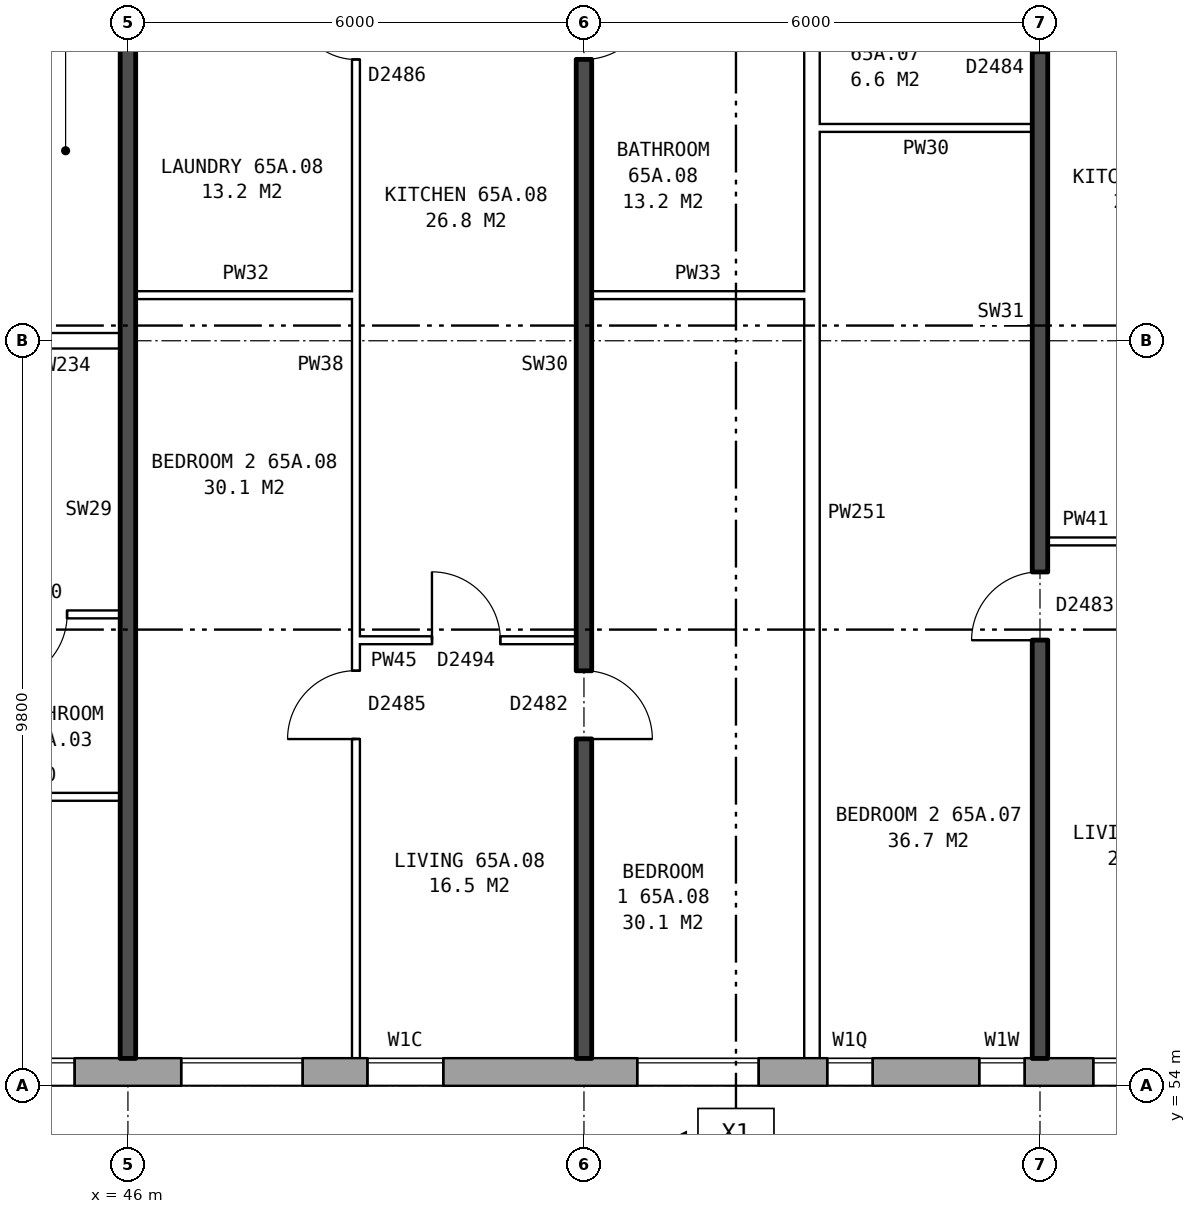
"""IFC4 building model, lengths in metres.
Left out: names, types, materials, properties, quantities, classifications, styles, units other than length and angle.
Written with IfcOpenShell. Run it as: python <this file> out.ifc"""

import sys

from ifc_helpers import new_model, si_unit, direction, frame, frame_2d, origin, place, context, subcontext, project, spatial, rectangle, extrude, element, fill, save


model = new_model("IFC4")
c1 = context("Model", 3, precision=1e-05, world=origin(), true_north=direction((0.0, 1.0)))
c2 = subcontext(c1, "Body", "Model", "MODEL_VIEW")
j1 = project(units=[si_unit("LENGTHUNIT", "METRE"), si_unit("PLANEANGLEUNIT", "RADIAN")], contexts=[c1])
p1 = place(None, origin())
s1 = spatial("IfcSite", under=j1, at=p1, CompositionType="ELEMENT")
p2 = place(p1, origin())
s2 = spatial("IfcBuilding", under=s1, at=p2, CompositionType="ELEMENT")
p3 = place(p2, frame((0.0, 0.0, 230.7)))
s3 = spatial("IfcBuildingStorey", under=s2, at=p3, CompositionType="ELEMENT", Elevation=230.7)
p4 = place(p3, frame((35.075, 54.18, 0.0), z_axis=(0.0, 0.0, 1.0), x_axis=(1.0, 0.0, 0.0)))
e1 = element("IfcWall", 1, at=p4, inside=s3, PredefinedType="STANDARD", context=c2, shape_type="SweptSolid", body=[
    extrude(rectangle(XDim=39.875, YDim=0.36, at=frame_2d((19.938, 0.0))), origin(), (0.0, 0.0, 1.0), 2.85),
])
p5 = place(p4, frame((2.625, 0.0, 0.8)))
e2 = element("IfcOpeningElement", 2, at=p5, cuts=e1, PredefinedType="OPENING", context=c2, shape_type="SweptSolid", body=[
    extrude(rectangle(XDim=1.6, YDim=1.8, at=frame_2d((0.8, 0.9))), frame((0.0, 0.19, 0.0), z_axis=(0.0, -1.0, 0.0), x_axis=(1.0, 0.0, 0.0)), (0.0, 0.0, 1.0), 0.38),
])
p6 = place(p4, frame((5.625, 0.0, 0.8)))
e3 = element("IfcOpeningElement", 3, at=p6, cuts=e1, PredefinedType="OPENING", context=c2, shape_type="SweptSolid", body=[
    extrude(rectangle(XDim=1.6, YDim=1.8, at=frame_2d((0.8, 0.9))), frame((0.0, 0.19, 0.0), z_axis=(0.0, -1.0, 0.0), x_axis=(1.0, 0.0, 0.0)), (0.0, 0.0, 1.0), 0.38),
])
p7 = place(p4, frame((8.625, 0.0, 0.8)))
e4 = element("IfcOpeningElement", 4, at=p7, cuts=e1, PredefinedType="OPENING", context=c2, shape_type="SweptSolid", body=[
    extrude(rectangle(XDim=1.6, YDim=1.8, at=frame_2d((0.8, 0.9))), frame((0.0, 0.19, 0.0), z_axis=(0.0, -1.0, 0.0), x_axis=(1.0, 0.0, 0.0)), (0.0, 0.0, 1.0), 0.38),
])
p8 = place(p4, frame((11.625, 0.0, 0.8)))
e5 = element("IfcOpeningElement", 5, at=p8, cuts=e1, PredefinedType="OPENING", context=c2, shape_type="SweptSolid", body=[
    extrude(rectangle(XDim=1.6, YDim=1.8, at=frame_2d((0.8, 0.9))), frame((0.0, 0.19, 0.0), z_axis=(0.0, -1.0, 0.0), x_axis=(1.0, 0.0, 0.0)), (0.0, 0.0, 1.0), 0.38),
])
p9 = place(p4, frame((14.075, 0.0, 0.8)))
e6 = element("IfcOpeningElement", 6, at=p9, cuts=e1, PredefinedType="OPENING", context=c2, shape_type="SweptSolid", body=[
    extrude(rectangle(XDim=1.0, YDim=1.8, at=frame_2d((0.5, 0.9))), frame((0.0, 0.19, 0.0), z_axis=(0.0, -1.0, 0.0), x_axis=(1.0, 0.0, 0.0)), (0.0, 0.0, 1.0), 0.38),
])
p10 = place(p4, frame((17.625, 0.0, 0.8)))
e7 = element("IfcOpeningElement", 7, at=p10, cuts=e1, PredefinedType="OPENING", context=c2, shape_type="SweptSolid", body=[
    extrude(rectangle(XDim=1.6, YDim=1.8, at=frame_2d((0.8, 0.9))), frame((0.0, 0.19, 0.0), z_axis=(0.0, -1.0, 0.0), x_axis=(1.0, 0.0, 0.0)), (0.0, 0.0, 1.0), 0.38),
])
p11 = place(p4, frame((20.125, 0.0, 0.8)))
e8 = element("IfcOpeningElement", 8, at=p11, cuts=e1, PredefinedType="OPENING", context=c2, shape_type="SweptSolid", body=[
    extrude(rectangle(XDim=0.6, YDim=1.2, at=frame_2d((0.3, 0.6))), frame((0.0, 0.19, 0.0), z_axis=(0.0, -1.0, 0.0), x_axis=(1.0, 0.0, 0.0)), (0.0, 0.0, 1.0), 0.38),
])
p12 = place(p4, frame((23.625, 0.0, 0.8)))
e9 = element("IfcOpeningElement", 9, at=p12, cuts=e1, PredefinedType="OPENING", context=c2, shape_type="SweptSolid", body=[
    extrude(rectangle(XDim=1.6, YDim=1.8, at=frame_2d((0.8, 0.9))), frame((0.0, 0.19, 0.0), z_axis=(0.0, -1.0, 0.0), x_axis=(1.0, 0.0, 0.0)), (0.0, 0.0, 1.0), 0.38),
])
p13 = place(p4, frame((26.625, 0.0, 0.8)))
e10 = element("IfcOpeningElement", 10, at=p13, cuts=e1, PredefinedType="OPENING", context=c2, shape_type="SweptSolid", body=[
    extrude(rectangle(XDim=1.6, YDim=1.8, at=frame_2d((0.8, 0.9))), frame((0.0, 0.19, 0.0), z_axis=(0.0, -1.0, 0.0), x_axis=(1.0, 0.0, 0.0)), (0.0, 0.0, 1.0), 0.38),
])
p14 = place(p4, frame((29.625, 0.0, 0.8)))
e11 = element("IfcOpeningElement", 11, at=p14, cuts=e1, PredefinedType="OPENING", context=c2, shape_type="SweptSolid", body=[
    extrude(rectangle(XDim=1.6, YDim=1.8, at=frame_2d((0.8, 0.9))), frame((0.0, 0.19, 0.0), z_axis=(0.0, -1.0, 0.0), x_axis=(1.0, 0.0, 0.0)), (0.0, 0.0, 1.0), 0.38),
])
p15 = place(p4, frame((32.625, 0.0, 0.8)))
e12 = element("IfcOpeningElement", 12, at=p15, cuts=e1, PredefinedType="OPENING", context=c2, shape_type="SweptSolid", body=[
    extrude(rectangle(XDim=1.6, YDim=1.8, at=frame_2d((0.8, 0.9))), frame((0.0, 0.19, 0.0), z_axis=(0.0, -1.0, 0.0), x_axis=(1.0, 0.0, 0.0)), (0.0, 0.0, 1.0), 0.38),
])
p16 = place(p4, frame((35.625, 0.0, 0.8)))
e13 = element("IfcOpeningElement", 13, at=p16, cuts=e1, PredefinedType="OPENING", context=c2, shape_type="SweptSolid", body=[
    extrude(rectangle(XDim=1.6, YDim=1.8, at=frame_2d((0.8, 0.9))), frame((0.0, 0.19, 0.0), z_axis=(0.0, -1.0, 0.0), x_axis=(1.0, 0.0, 0.0)), (0.0, 0.0, 1.0), 0.38),
])
p17 = place(p4, frame((22.125, 0.0, 1.7)))
e14 = element("IfcOpeningElement", 14, at=p17, cuts=e1, PredefinedType="OPENING", context=c2, shape_type="SweptSolid", body=[
    extrude(rectangle(XDim=0.6, YDim=0.9, at=frame_2d((0.3, 0.45))), frame((0.0, 0.19, 0.0), z_axis=(0.0, -1.0, 0.0), x_axis=(1.0, 0.0, 0.0)), (0.0, 0.0, 1.0), 0.38),
])
p18 = place(p3, frame((43.6, 57.8, 0.0), z_axis=(0.0, 0.0, 1.0), x_axis=(1.0, 0.0, 0.0)))
e15 = element("IfcWall", 15, at=p18, inside=s3, PredefinedType="PARTITIONING", context=c2, shape_type="SweptSolid", body=[
    extrude(rectangle(XDim=2.3, YDim=0.1, at=frame_2d((1.15, 0.0))), origin(), (0.0, 0.0, 1.0), 2.85),
])
p19 = place(p3, frame((49.0, 59.86, 0.0), z_axis=(0.0, 0.0, 1.0), x_axis=(1.0, 0.0, 0.0)))
e16 = element("IfcWall", 16, at=p19, inside=s3, PredefinedType="PARTITIONING", context=c2, shape_type="SweptSolid", body=[
    extrude(rectangle(XDim=2.9, YDim=0.1, at=frame_2d((1.45, 0.0))), origin(), (0.0, 0.0, 1.0), 2.85),
])
p20 = place(p19, frame((1.0, 0.0, 0.0)))
e17 = element("IfcOpeningElement", 17, at=p20, cuts=e16, PredefinedType="OPENING", context=c2, shape_type="SweptSolid", body=[
    extrude(rectangle(XDim=0.9, YDim=2.1, at=frame_2d((0.45, 1.05))), frame((0.0, 0.06, 0.0), z_axis=(0.0, -1.0, 0.0), x_axis=(1.0, 0.0, 0.0)), (0.0, 0.0, 1.0), 0.12),
])
p21 = place(p3, frame((40.1, 60.2, 0.0), z_axis=(0.0, 0.0, 1.0), x_axis=(1.0, 0.0, 0.0)))
e18 = element("IfcWall", 18, at=p21, inside=s3, PredefinedType="PARTITIONING", context=c2, shape_type="SweptSolid", body=[
    extrude(rectangle(XDim=5.8, YDim=0.1, at=frame_2d((2.9, 0.0))), origin(), (0.0, 0.0, 1.0), 2.85),
])
p22 = place(p21, frame((1.3, 0.0, 0.0)))
e19 = element("IfcOpeningElement", 19, at=p22, cuts=e18, PredefinedType="OPENING", context=c2, shape_type="SweptSolid", body=[
    extrude(rectangle(XDim=0.9, YDim=2.1, at=frame_2d((0.45, 1.05))), frame((0.0, 0.06, 0.0), z_axis=(0.0, -1.0, 0.0), x_axis=(1.0, 0.0, 0.0)), (0.0, 0.0, 1.0), 0.12),
])
p23 = place(p21, frame((4.2, 0.0, 0.0)))
e20 = element("IfcOpeningElement", 20, at=p23, cuts=e18, PredefinedType="OPENING", context=c2, shape_type="SweptSolid", body=[
    extrude(rectangle(XDim=0.9, YDim=2.1, at=frame_2d((0.45, 1.05))), frame((0.0, 0.06, 0.0), z_axis=(0.0, -1.0, 0.0), x_axis=(1.0, 0.0, 0.0)), (0.0, 0.0, 1.0), 0.12),
])
p24 = place(p3, frame((58.1, 61.16, 0.0), z_axis=(0.0, 0.0, 1.0), x_axis=(1.0, 0.0, 0.0)))
e21 = element("IfcWall", 21, at=p24, inside=s3, PredefinedType="PARTITIONING", context=c2, shape_type="SweptSolid", body=[
    extrude(rectangle(XDim=2.9, YDim=0.1, at=frame_2d((1.45, 0.0))), origin(), (0.0, 0.0, 1.0), 2.85),
])
p25 = place(p24, frame((1.0, 0.0, 0.0)))
e22 = element("IfcOpeningElement", 22, at=p25, cuts=e21, PredefinedType="OPENING", context=c2, shape_type="SweptSolid", body=[
    extrude(rectangle(XDim=0.9, YDim=2.1, at=frame_2d((0.45, 1.05))), frame((0.0, 0.06, 0.0), z_axis=(0.0, -1.0, 0.0), x_axis=(1.0, 0.0, 0.0)), (0.0, 0.0, 1.0), 0.12),
])
p26 = place(p3, frame((44.36, 63.8, 0.0), z_axis=(0.0, 0.0, 1.0), x_axis=(1.0, 0.0, 0.0)))
e23 = element("IfcWall", 23, at=p26, inside=s3, PredefinedType="PARTITIONING", context=c2, shape_type="SweptSolid", body=[
    extrude(rectangle(XDim=1.54, YDim=0.2, at=frame_2d((0.77, 0.0))), origin(), (0.0, 0.0, 1.0), 2.85),
])
p27 = place(p3, frame((46.1, 64.4, 0.0), z_axis=(0.0, 0.0, 1.0), x_axis=(1.0, 0.0, 0.0)))
e24 = element("IfcWall", 24, at=p27, inside=s3, PredefinedType="PARTITIONING", context=c2, shape_type="SweptSolid", body=[
    extrude(rectangle(XDim=2.9, YDim=0.1, at=frame_2d((1.45, 0.0))), origin(), (0.0, 0.0, 1.0), 2.85),
])
for number, where, z_axis, x_axis in (
    (25, (52.1, 64.4, 0.0), (0.0, 0.0, 1.0), (1.0, 0.0, 0.0)),
    (26, (55.1, 66.6, 0.0), (0.0, 0.0, 1.0), (1.0, 0.0, 0.0)),
):
    element("IfcWall", number, at=place(p3, frame(where, z_axis=z_axis, x_axis=x_axis)), inside=s3, PredefinedType="PARTITIONING", context=c2, shape_type="SweptSolid", body=[
        extrude(rectangle(XDim=2.8, YDim=0.1, at=frame_2d((1.4, 0.0))), origin(), (0.0, 0.0, 1.0), 2.85),
    ])
p28 = place(p3, frame((46.0, 54.36, 0.0), z_axis=(0.0, 0.0, 1.0), x_axis=(0.0, 1.0, 0.0)))
e27 = element("IfcWall", 27, at=p28, inside=s3, PredefinedType="SOLIDWALL", context=c2, shape_type="SweptSolid", body=[
    extrude(rectangle(XDim=14.44, YDim=0.2, at=frame_2d((7.22, 0.0))), origin(), (0.0, 0.0, 1.0), 2.85),
])
p29 = place(p3, frame((49.0, 54.36, 0.0), z_axis=(0.0, 0.0, 1.0), x_axis=(0.0, 1.0, 0.0)))
e28 = element("IfcWall", 28, at=p29, inside=s3, PredefinedType="PARTITIONING", context=c2, shape_type="SweptSolid", body=[
    extrude(rectangle(XDim=14.34, YDim=0.1, at=frame_2d((7.17, 0.0))), origin(), (0.0, 0.0, 1.0), 2.85),
])
p30 = place(p29, frame((4.2, 0.0, 0.0)))
e29 = element("IfcOpeningElement", 29, at=p30, cuts=e28, PredefinedType="OPENING", context=c2, shape_type="SweptSolid", body=[
    extrude(rectangle(XDim=0.9, YDim=2.1, at=frame_2d((0.45, 1.05))), frame((0.0, 0.06, 0.0), z_axis=(0.0, -1.0, 0.0), x_axis=(1.0, 0.0, 0.0)), (0.0, 0.0, 1.0), 0.12),
])
p31 = place(p29, frame((13.14, 0.0, 0.0)))
e30 = element("IfcOpeningElement", 30, at=p31, cuts=e28, PredefinedType="OPENING", context=c2, shape_type="SweptSolid", body=[
    extrude(rectangle(XDim=0.8, YDim=2.1, at=frame_2d((0.4, 1.05))), frame((0.0, 0.06, 0.0), z_axis=(0.0, -1.0, 0.0), x_axis=(1.0, 0.0, 0.0)), (0.0, 0.0, 1.0), 0.12),
])
p32 = place(p3, frame((52.0, 54.36, 0.0), z_axis=(0.0, 0.0, 1.0), x_axis=(0.0, 1.0, 0.0)))
e31 = element("IfcWall", 31, at=p32, inside=s3, PredefinedType="SOLIDWALL", context=c2, shape_type="SweptSolid", body=[
    extrude(rectangle(XDim=14.44, YDim=0.2, at=frame_2d((7.22, 0.0))), origin(), (0.0, 0.0, 1.0), 2.85),
])
p33 = place(p32, frame((4.2, 0.0, 0.0)))
e32 = element("IfcOpeningElement", 32, at=p33, cuts=e31, PredefinedType="OPENING", context=c2, shape_type="SweptSolid", body=[
    extrude(rectangle(XDim=0.9, YDim=2.1, at=frame_2d((0.45, 1.05))), frame((0.0, 0.11, 0.0), z_axis=(0.0, -1.0, 0.0), x_axis=(1.0, 0.0, 0.0)), (0.0, 0.0, 1.0), 0.22),
])
p34 = place(p32, frame((13.14, 0.0, 0.0)))
e33 = element("IfcOpeningElement", 33, at=p34, cuts=e31, PredefinedType="OPENING", context=c2, shape_type="SweptSolid", body=[
    extrude(rectangle(XDim=0.9, YDim=2.1, at=frame_2d((0.45, 1.05))), frame((0.0, 0.11, 0.0), z_axis=(0.0, -1.0, 0.0), x_axis=(1.0, 0.0, 0.0)), (0.0, 0.0, 1.0), 0.22),
])
p35 = place(p3, frame((55.0, 54.36, 0.0), z_axis=(0.0, 0.0, 1.0), x_axis=(0.0, 1.0, 0.0)))
e34 = element("IfcWall", 34, at=p35, inside=s3, PredefinedType="PARTITIONING", context=c2, shape_type="SweptSolid", body=[
    extrude(rectangle(XDim=14.34, YDim=0.2, at=frame_2d((7.17, 0.0))), origin(), (0.0, 0.0, 1.0), 2.85),
])
p36 = place(p3, frame((58.0, 54.36, 0.0), z_axis=(0.0, 0.0, 1.0), x_axis=(0.0, 1.0, 0.0)))
e35 = element("IfcWall", 35, at=p36, inside=s3, PredefinedType="SOLIDWALL", context=c2, shape_type="SweptSolid", body=[
    extrude(rectangle(XDim=14.44, YDim=0.2, at=frame_2d((7.22, 0.0))), origin(), (0.0, 0.0, 1.0), 2.85),
])
p37 = place(p36, frame((5.5, 0.0, 0.0)))
e36 = element("IfcOpeningElement", 36, at=p37, cuts=e35, PredefinedType="OPENING", context=c2, shape_type="SweptSolid", body=[
    extrude(rectangle(XDim=0.9, YDim=2.1, at=frame_2d((0.45, 1.05))), frame((0.0, 0.11, 0.0), z_axis=(0.0, -1.0, 0.0), x_axis=(1.0, 0.0, 0.0)), (0.0, 0.0, 1.0), 0.22),
])
p38 = place(p36, frame((13.24, 0.0, 0.0)))
e37 = element("IfcOpeningElement", 37, at=p38, cuts=e35, PredefinedType="OPENING", context=c2, shape_type="SweptSolid", body=[
    extrude(rectangle(XDim=0.8, YDim=2.1, at=frame_2d((0.4, 1.05))), frame((0.0, 0.11, 0.0), z_axis=(0.0, -1.0, 0.0), x_axis=(1.0, 0.0, 0.0)), (0.0, 0.0, 1.0), 0.22),
])
p39 = place(p7, origin())
e38 = element("IfcWindow", 38, at=p39, inside=s3, PartitioningType="SINGLE_PANEL", PredefinedType="WINDOW", context=c2, shape_type="SweptSolid", body=[
    extrude(rectangle(XDim=1.6, YDim=1.8, at=frame_2d((0.8, 0.9))), frame((0.0, 0.15, 0.0), z_axis=(0.0, -1.0, 0.0), x_axis=(1.0, 0.0, 0.0)), (0.0, 0.0, 1.0), 0.06),
])
fill(e4, e38)
p40 = place(p8, origin())
e39 = element("IfcWindow", 39, at=p40, inside=s3, PartitioningType="SINGLE_PANEL", PredefinedType="WINDOW", context=c2, shape_type="SweptSolid", body=[
    extrude(rectangle(XDim=1.6, YDim=1.8, at=frame_2d((0.8, 0.9))), frame((0.0, 0.15, 0.0), z_axis=(0.0, -1.0, 0.0), x_axis=(1.0, 0.0, 0.0)), (0.0, 0.0, 1.0), 0.06),
])
fill(e5, e39)
p41 = place(p9, origin())
e40 = element("IfcWindow", 40, at=p41, inside=s3, PartitioningType="SINGLE_PANEL", PredefinedType="WINDOW", context=c2, shape_type="SweptSolid", body=[
    extrude(rectangle(XDim=1.0, YDim=1.8, at=frame_2d((0.5, 0.9))), frame((0.0, 0.15, 0.0), z_axis=(0.0, -1.0, 0.0), x_axis=(1.0, 0.0, 0.0)), (0.0, 0.0, 1.0), 0.06),
])
fill(e6, e40)
p42 = place(p10, origin())
e41 = element("IfcWindow", 41, at=p42, inside=s3, PartitioningType="SINGLE_PANEL", PredefinedType="WINDOW", context=c2, shape_type="SweptSolid", body=[
    extrude(rectangle(XDim=1.6, YDim=1.8, at=frame_2d((0.8, 0.9))), frame((0.0, 0.15, 0.0), z_axis=(0.0, -1.0, 0.0), x_axis=(1.0, 0.0, 0.0)), (0.0, 0.0, 1.0), 0.06),
])
fill(e7, e41)
p43 = place(p11, origin())
e42 = element("IfcWindow", 42, at=p43, inside=s3, PartitioningType="SINGLE_PANEL", PredefinedType="WINDOW", context=c2, shape_type="SweptSolid", body=[
    extrude(rectangle(XDim=0.6, YDim=1.2, at=frame_2d((0.3, 0.6))), frame((0.0, 0.15, 0.0), z_axis=(0.0, -1.0, 0.0), x_axis=(1.0, 0.0, 0.0)), (0.0, 0.0, 1.0), 0.06),
])
fill(e8, e42)
p44 = place(p12, origin())
e43 = element("IfcWindow", 43, at=p44, inside=s3, PartitioningType="SINGLE_PANEL", PredefinedType="WINDOW", context=c2, shape_type="SweptSolid", body=[
    extrude(rectangle(XDim=1.6, YDim=1.8, at=frame_2d((0.8, 0.9))), frame((0.0, 0.15, 0.0), z_axis=(0.0, -1.0, 0.0), x_axis=(1.0, 0.0, 0.0)), (0.0, 0.0, 1.0), 0.06),
])
fill(e9, e43)
p45 = place(p23, frame((0.9, 0.0, 0.0), z_axis=(0.0, 0.0, 1.0), x_axis=(-1.0, 0.0, 0.0)))
e44 = element("IfcDoor", 44, at=p45, inside=s3, OperationType="SINGLE_SWING_RIGHT", PredefinedType="DOOR", context=c2, shape_type="SweptSolid", body=[
    extrude(rectangle(XDim=0.9, YDim=2.1, at=frame_2d((0.45, 1.05))), frame((0.0, 0.025, 0.0), z_axis=(0.0, -1.0, 0.0), x_axis=(1.0, 0.0, 0.0)), (0.0, 0.0, 1.0), 0.05),
])
fill(e20, e44)
p46 = place(p37, origin())
e45 = element("IfcDoor", 45, at=p46, inside=s3, OperationType="SINGLE_SWING_LEFT", PredefinedType="DOOR", context=c2, shape_type="SweptSolid", body=[
    extrude(rectangle(XDim=0.9, YDim=2.1, at=frame_2d((0.45, 1.05))), frame((0.0, 0.025, 0.0), z_axis=(0.0, -1.0, 0.0), x_axis=(1.0, 0.0, 0.0)), (0.0, 0.0, 1.0), 0.05),
])
fill(e36, e45)
p47 = place(p38, origin())
e46 = element("IfcDoor", 46, at=p47, inside=s3, OperationType="SINGLE_SWING_RIGHT", PredefinedType="DOOR", context=c2, shape_type="SweptSolid", body=[
    extrude(rectangle(XDim=0.8, YDim=2.1, at=frame_2d((0.4, 1.05))), frame((0.0, 0.025, 0.0), z_axis=(0.0, -1.0, 0.0), x_axis=(1.0, 0.0, 0.0)), (0.0, 0.0, 1.0), 0.05),
])
fill(e37, e46)
p48 = place(p33, frame((0.9, 0.0, 0.0), z_axis=(0.0, 0.0, 1.0), x_axis=(-1.0, 0.0, 0.0)))
e47 = element("IfcDoor", 47, at=p48, inside=s3, OperationType="SINGLE_SWING_RIGHT", PredefinedType="DOOR", context=c2, shape_type="SweptSolid", body=[
    extrude(rectangle(XDim=0.9, YDim=2.1, at=frame_2d((0.45, 1.05))), frame((0.0, 0.025, 0.0), z_axis=(0.0, -1.0, 0.0), x_axis=(1.0, 0.0, 0.0)), (0.0, 0.0, 1.0), 0.05),
])
fill(e32, e47)
p49 = place(p30, origin())
e48 = element("IfcDoor", 48, at=p49, inside=s3, OperationType="SINGLE_SWING_LEFT", PredefinedType="DOOR", context=c2, shape_type="SweptSolid", body=[
    extrude(rectangle(XDim=0.9, YDim=2.1, at=frame_2d((0.45, 1.05))), frame((0.0, 0.025, 0.0), z_axis=(0.0, -1.0, 0.0), x_axis=(1.0, 0.0, 0.0)), (0.0, 0.0, 1.0), 0.05),
])
fill(e29, e48)
p50 = place(p20, origin())
e49 = element("IfcDoor", 49, at=p50, inside=s3, OperationType="SINGLE_SWING_LEFT", PredefinedType="DOOR", context=c2, shape_type="SweptSolid", body=[
    extrude(rectangle(XDim=0.9, YDim=2.1, at=frame_2d((0.45, 1.05))), frame((0.0, 0.025, 0.0), z_axis=(0.0, -1.0, 0.0), x_axis=(1.0, 0.0, 0.0)), (0.0, 0.0, 1.0), 0.05),
])
fill(e17, e49)
p51 = place(p34, frame((0.9, 0.0, 0.0), z_axis=(0.0, 0.0, 1.0), x_axis=(-1.0, 0.0, 0.0)))
e50 = element("IfcDoor", 50, at=p51, inside=s3, OperationType="SINGLE_SWING_LEFT", PredefinedType="DOOR", context=c2, shape_type="SweptSolid", body=[
    extrude(rectangle(XDim=0.9, YDim=2.1, at=frame_2d((0.45, 1.05))), frame((0.0, 0.025, 0.0), z_axis=(0.0, -1.0, 0.0), x_axis=(1.0, 0.0, 0.0)), (0.0, 0.0, 1.0), 0.05),
])
fill(e33, e50)
p52 = place(p31, origin())
e51 = element("IfcDoor", 51, at=p52, inside=s3, OperationType="SINGLE_SWING_RIGHT", PredefinedType="DOOR", context=c2, shape_type="SweptSolid", body=[
    extrude(rectangle(XDim=0.8, YDim=2.1, at=frame_2d((0.4, 1.05))), frame((0.0, 0.025, 0.0), z_axis=(0.0, -1.0, 0.0), x_axis=(1.0, 0.0, 0.0)), (0.0, 0.0, 1.0), 0.05),
])
fill(e30, e51)
p53 = place(p17, origin())
e52 = element("IfcWindow", 52, at=p53, inside=s3, PartitioningType="SINGLE_PANEL", PredefinedType="WINDOW", context=c2, shape_type="SweptSolid", body=[
    extrude(rectangle(XDim=0.6, YDim=0.9, at=frame_2d((0.3, 0.45))), frame((0.0, 0.15, 0.0), z_axis=(0.0, -1.0, 0.0), x_axis=(1.0, 0.0, 0.0)), (0.0, 0.0, 1.0), 0.06),
])
fill(e14, e52)
save(model, sys.argv[1])
